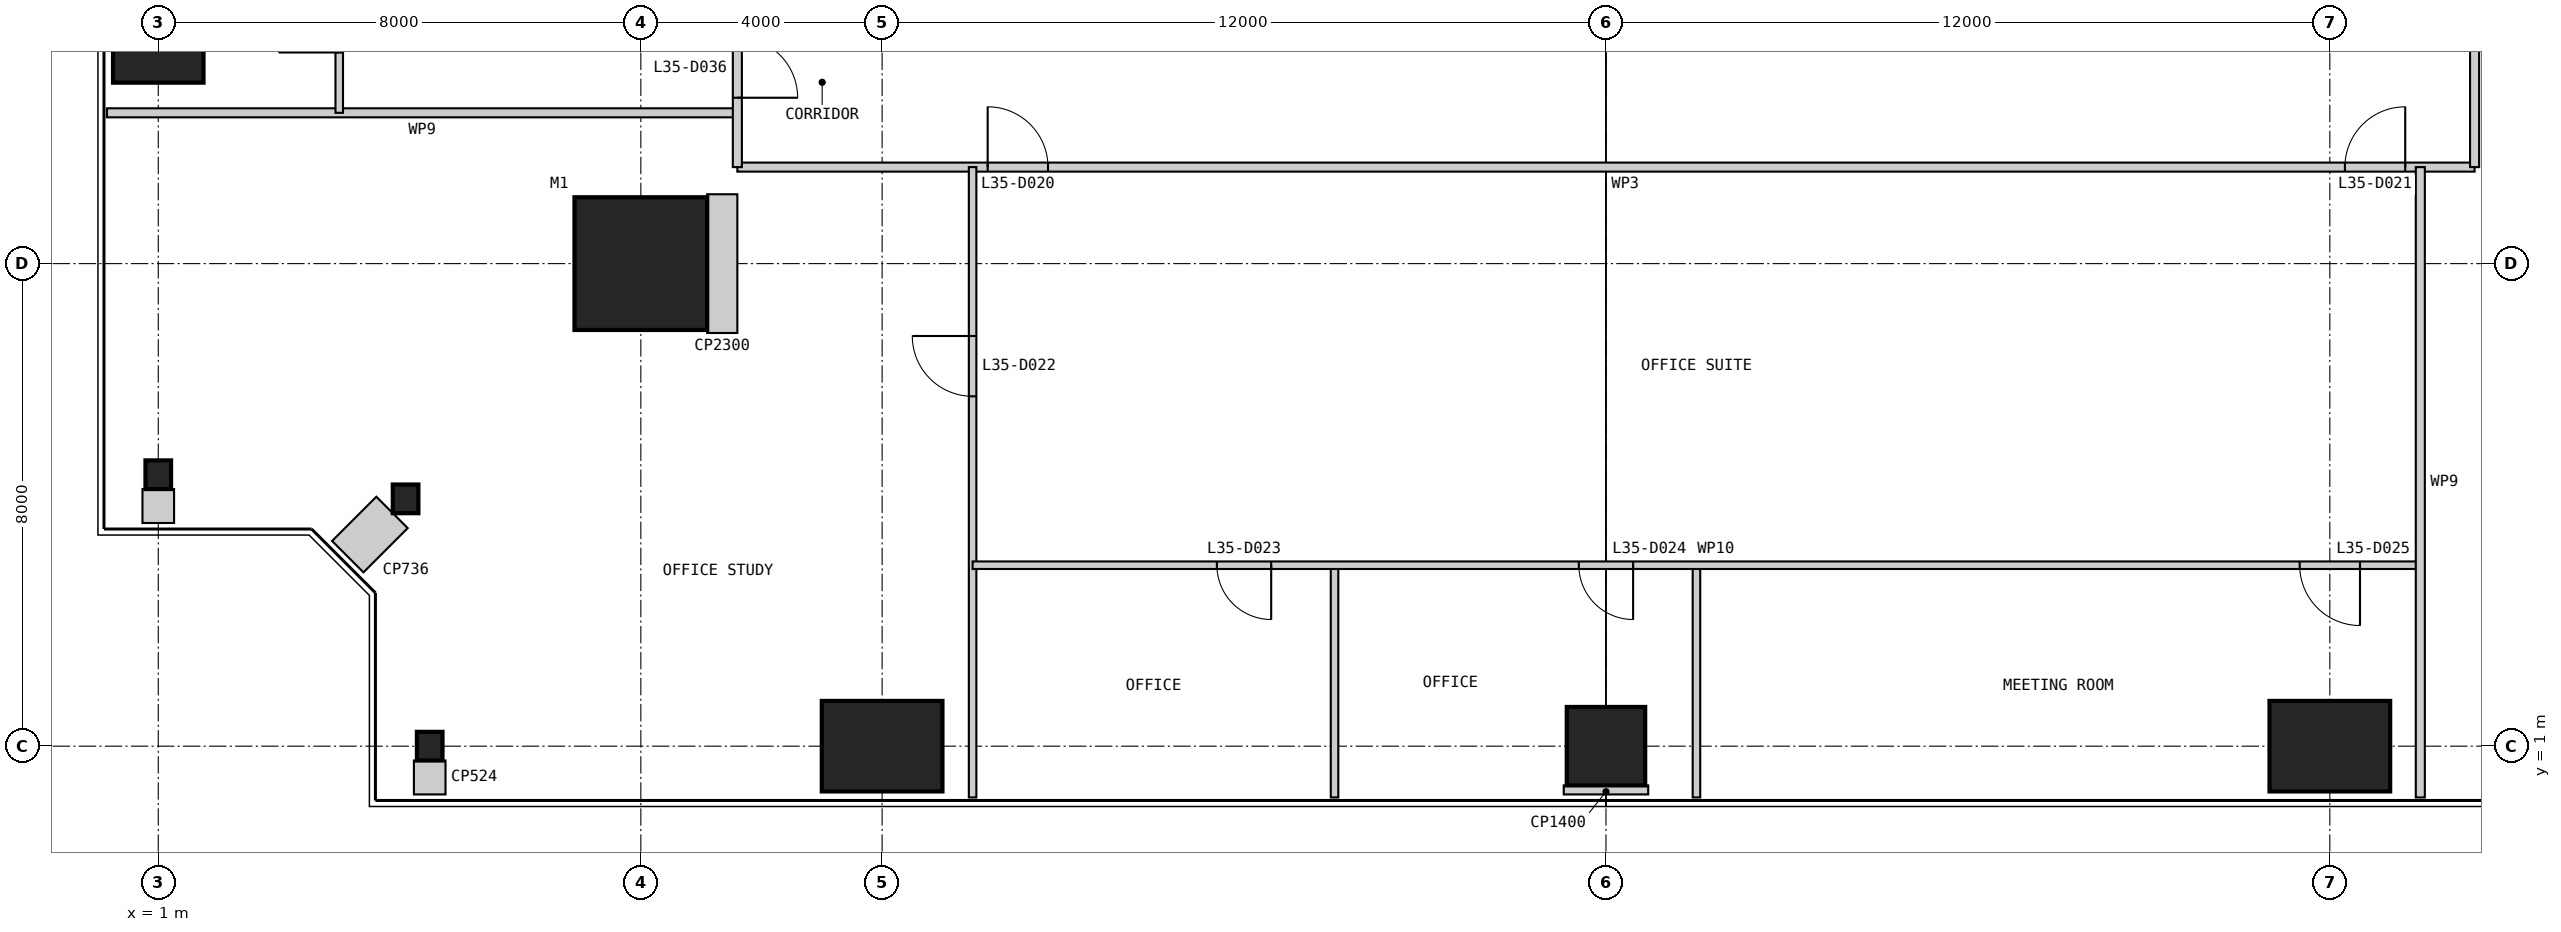
"""IFC4 building model, lengths in metres.
Left out: names, types, materials, properties, quantities, classifications, styles, units other than length and angle.
Written with IfcOpenShell. Run it as: python <this file> out.ifc"""

import sys

from ifc_helpers import new_model, si_unit, direction, frame, frame_2d, origin, origin_2d, place, context, subcontext, project, spatial, rectangle, i_section, extrude, element, fill, save


model = new_model("IFC4")
c1 = context("Model", 3, precision=1e-05, world=origin(), true_north=direction((0.0, 1.0)))
c2 = subcontext(c1, "Body", "Model", "MODEL_VIEW")
j1 = project(units=[si_unit("LENGTHUNIT", "METRE"), si_unit("PLANEANGLEUNIT", "RADIAN")], contexts=[c1])
p1 = place(None, origin())
s1 = spatial("IfcSite", under=j1, at=p1, CompositionType="ELEMENT")
p2 = place(p1, origin())
s2 = spatial("IfcBuilding", under=s1, at=p2, CompositionType="ELEMENT")
p3 = place(p2, frame((0.0, 0.0, 150.4)))
s3 = spatial("IfcBuildingStorey", under=s2, at=p3, CompositionType="ELEMENT", Elevation=150.4)
p4 = place(p3, frame((9.0, 9.0, 0.0), z_axis=(0.0, 0.0, 1.0), x_axis=(1.0, 0.0, 0.0)))
e1 = element("IfcColumn", 1, at=p4, inside=s3, PredefinedType="COLUMN", context=c2, shape_type="SweptSolid", body=[
    extrude(rectangle(XDim=2.2, YDim=2.2, at=origin_2d()), origin(), (0.0, 0.0, 1.0), 4.0),
])
p5 = place(p3, frame((5.5, 1.0, 0.0), z_axis=(0.0, 0.0, 1.0), x_axis=(1.0, 0.0, 0.0)))
e2 = element("IfcColumn", 2, at=p5, inside=s3, PredefinedType="COLUMN", context=c2, shape_type="SweptSolid", body=[
    extrude(i_section(OverallWidth=0.424, OverallDepth=0.475, WebThickness=0.048, FlangeThickness=0.077, at=origin_2d()), origin(), (0.0, 0.0, 1.0), 4.0),
])
p6 = place(p3, frame((13.0, 1.0, 0.0), z_axis=(0.0, 0.0, 1.0), x_axis=(1.0, 0.0, 0.0)))
e3 = element("IfcColumn", 3, at=p6, inside=s3, PredefinedType="COLUMN", context=c2, shape_type="SweptSolid", body=[
    extrude(rectangle(XDim=2.0, YDim=1.5, at=origin_2d()), origin(), (0.0, 0.0, 1.0), 4.0),
])
p7 = place(p3, frame((25.0, 1.0, 0.0), z_axis=(0.0, 0.0, 1.0), x_axis=(1.0, 0.0, 0.0)))
e4 = element("IfcColumn", 4, at=p7, inside=s3, PredefinedType="COLUMN", context=c2, shape_type="SweptSolid", body=[
    extrude(rectangle(XDim=1.3, YDim=1.3, at=origin_2d()), origin(), (0.0, 0.0, 1.0), 4.0),
])
p8 = place(p3, frame((37.0, 1.0, 0.0), z_axis=(0.0, 0.0, 1.0), x_axis=(1.0, 0.0, 0.0)))
e5 = element("IfcColumn", 5, at=p8, inside=s3, PredefinedType="COLUMN", context=c2, shape_type="SweptSolid", body=[
    extrude(rectangle(XDim=2.0, YDim=1.5, at=origin_2d()), origin(), (0.0, 0.0, 1.0), 4.0),
])
p9 = place(p3, frame((1.0, 13.0, 0.0), z_axis=(0.0, 0.0, 1.0), x_axis=(1.0, 0.0, 0.0)))
e6 = element("IfcColumn", 6, at=p9, inside=s3, PredefinedType="COLUMN", context=c2, shape_type="SweptSolid", body=[
    extrude(rectangle(XDim=1.5, YDim=2.0, at=origin_2d()), origin(), (0.0, 0.0, 1.0), 4.0),
])
for number, where, z_axis, x_axis in (
    (7, (1.0, 5.5, 0.0), (0.0, 0.0, 1.0), (1.0, 0.0, 0.0)),
    (8, (5.1, 5.1, 0.0), (0.0, 0.0, 1.0), (1.0, 0.0, 0.0)),
):
    element("IfcColumn", number, at=place(p3, frame(where, z_axis=z_axis, x_axis=x_axis)), inside=s3, PredefinedType="COLUMN", context=c2, shape_type="SweptSolid", body=[
        extrude(i_section(OverallWidth=0.424, OverallDepth=0.475, WebThickness=0.048, FlangeThickness=0.077, at=origin_2d()), origin(), (0.0, 0.0, 1.0), 4.0),
    ])
p10 = place(p3, frame((10.6, 10.6, 0.0), z_axis=(0.0, 0.0, 1.0), x_axis=(1.0, 0.0, 0.0)))
e9 = element("IfcWall", 9, at=p10, inside=s3, PredefinedType="PARTITIONING", context=c2, shape_type="SweptSolid", body=[
    extrude(rectangle(XDim=28.8, YDim=0.15, at=frame_2d((14.4, 0.0))), origin(), (0.0, 0.0, 1.0), 3.85),
])
p11 = place(p10, frame((4.15, 0.0, 0.0)))
e10 = element("IfcOpeningElement", 10, at=p11, cuts=e9, PredefinedType="OPENING", context=c2, shape_type="SweptSolid", body=[
    extrude(rectangle(XDim=1.0, YDim=2.2, at=frame_2d((0.5, 1.1))), frame((0.0, 0.085, 0.0), z_axis=(0.0, -1.0, 0.0), x_axis=(1.0, 0.0, 0.0)), (0.0, 0.0, 1.0), 0.17),
])
p12 = place(p10, frame((26.65, 0.0, 0.0)))
e11 = element("IfcOpeningElement", 11, at=p12, cuts=e9, PredefinedType="OPENING", context=c2, shape_type="SweptSolid", body=[
    extrude(rectangle(XDim=1.0, YDim=2.2, at=frame_2d((0.5, 1.1))), frame((0.0, 0.085, 0.0), z_axis=(0.0, -1.0, 0.0), x_axis=(1.0, 0.0, 0.0)), (0.0, 0.0, 1.0), 0.17),
])
p13 = place(p3, frame((0.15, 11.5, 0.0), z_axis=(0.0, 0.0, 1.0), x_axis=(1.0, 0.0, 0.0)))
e12 = element("IfcWall", 12, at=p13, inside=s3, PredefinedType="PARTITIONING", context=c2, shape_type="SweptSolid", body=[
    extrude(rectangle(XDim=10.45, YDim=0.15, at=frame_2d((5.225, 0.0))), origin(), (0.0, 0.0, 1.0), 3.85),
])
p14 = place(p3, frame((14.5, 0.15, 0.0), z_axis=(0.0, 0.0, 1.0), x_axis=(0.0, 1.0, 0.0)))
e13 = element("IfcWall", 13, at=p14, inside=s3, PredefinedType="PARTITIONING", context=c2, shape_type="SweptSolid", body=[
    extrude(rectangle(XDim=10.45, YDim=0.125, at=frame_2d((5.225, 0.0))), origin(), (0.0, 0.0, 1.0), 3.85),
])
p15 = place(p14, frame((6.65, 0.0, 0.0)))
e14 = element("IfcOpeningElement", 14, at=p15, cuts=e13, PredefinedType="OPENING", context=c2, shape_type="SweptSolid", body=[
    extrude(rectangle(XDim=1.0, YDim=2.2, at=frame_2d((0.5, 1.1))), frame((0.0, 0.073, 0.0), z_axis=(0.0, -1.0, 0.0), x_axis=(1.0, 0.0, 0.0)), (0.0, 0.0, 1.0), 0.145),
])
for number, where, z_axis, x_axis in (
    (15, (20.5, 0.15, 0.0), (0.0, 0.0, 1.0), (0.0, 1.0, 0.0)),
    (16, (26.5, 0.15, 0.0), (0.0, 0.0, 1.0), (0.0, 1.0, 0.0)),
):
    element("IfcWall", number, at=place(p3, frame(where, z_axis=z_axis, x_axis=x_axis)), inside=s3, PredefinedType="PARTITIONING", context=c2, shape_type="SweptSolid", body=[
        extrude(rectangle(XDim=3.85, YDim=0.125, at=frame_2d((1.925, 0.0))), origin(), (0.0, 0.0, 1.0), 3.85),
    ])
p16 = place(p3, frame((14.5, 4.0, 0.0), z_axis=(0.0, 0.0, 1.0), x_axis=(1.0, 0.0, 0.0)))
e17 = element("IfcWall", 17, at=p16, inside=s3, PredefinedType="PARTITIONING", context=c2, shape_type="SweptSolid", body=[
    extrude(rectangle(XDim=24.0, YDim=0.125, at=frame_2d((12.0, 0.0))), origin(), (0.0, 0.0, 1.0), 3.85),
])
p17 = place(p16, frame((4.05, 0.0, 0.0)))
e18 = element("IfcOpeningElement", 18, at=p17, cuts=e17, PredefinedType="OPENING", context=c2, shape_type="SweptSolid", body=[
    extrude(rectangle(XDim=0.9, YDim=2.2, at=frame_2d((0.45, 1.1))), frame((0.0, 0.073, 0.0), z_axis=(0.0, -1.0, 0.0), x_axis=(1.0, 0.0, 0.0)), (0.0, 0.0, 1.0), 0.145),
])
p18 = place(p16, frame((10.05, 0.0, 0.0)))
e19 = element("IfcOpeningElement", 19, at=p18, cuts=e17, PredefinedType="OPENING", context=c2, shape_type="SweptSolid", body=[
    extrude(rectangle(XDim=0.9, YDim=2.2, at=frame_2d((0.45, 1.1))), frame((0.0, 0.073, 0.0), z_axis=(0.0, -1.0, 0.0), x_axis=(1.0, 0.0, 0.0)), (0.0, 0.0, 1.0), 0.145),
])
p19 = place(p16, frame((22.0, 0.0, 0.0)))
e20 = element("IfcOpeningElement", 20, at=p19, cuts=e17, PredefinedType="OPENING", context=c2, shape_type="SweptSolid", body=[
    extrude(rectangle(XDim=1.0, YDim=2.2, at=frame_2d((0.5, 1.1))), frame((0.0, 0.073, 0.0), z_axis=(0.0, -1.0, 0.0), x_axis=(1.0, 0.0, 0.0)), (0.0, 0.0, 1.0), 0.145),
])
p20 = place(p3, frame((39.4, 10.6, 0.0), z_axis=(0.0, 0.0, 1.0), x_axis=(0.0, 1.0, 0.0)))
e21 = element("IfcWall", 21, at=p20, inside=s3, PredefinedType="PARTITIONING", context=c2, shape_type="SweptSolid", body=[
    extrude(rectangle(XDim=27.9, YDim=0.15, at=frame_2d((13.95, 0.0))), origin(), (0.0, 0.0, 1.0), 3.85),
])
p21 = place(p20, frame((4.15, 0.0, 0.0)))
e22 = element("IfcOpeningElement", 22, at=p21, cuts=e21, PredefinedType="OPENING", context=c2, shape_type="SweptSolid", body=[
    extrude(rectangle(XDim=1.0, YDim=2.2, at=frame_2d((0.5, 1.1))), frame((0.0, 0.085, 0.0), z_axis=(0.0, -1.0, 0.0), x_axis=(1.0, 0.0, 0.0)), (0.0, 0.0, 1.0), 0.17),
])
p22 = place(p20, frame((23.65, 0.0, 0.0)))
e23 = element("IfcOpeningElement", 23, at=p22, cuts=e21, PredefinedType="OPENING", context=c2, shape_type="SweptSolid", body=[
    extrude(rectangle(XDim=1.0, YDim=2.2, at=frame_2d((0.5, 1.1))), frame((0.0, 0.085, 0.0), z_axis=(0.0, -1.0, 0.0), x_axis=(1.0, 0.0, 0.0)), (0.0, 0.0, 1.0), 0.17),
])
p23 = place(p3, frame((38.5, 0.15, 0.0), z_axis=(0.0, 0.0, 1.0), x_axis=(0.0, 1.0, 0.0)))
e24 = element("IfcWall", 24, at=p23, inside=s3, PredefinedType="PARTITIONING", context=c2, shape_type="SweptSolid", body=[
    extrude(rectangle(XDim=10.45, YDim=0.15, at=frame_2d((5.225, 0.0))), origin(), (0.0, 0.0, 1.0), 3.85),
])
p24 = place(p3, frame((10.6, 38.5, 0.0), z_axis=(0.0, 0.0, 1.0), x_axis=(0.0, -1.0, 0.0)))
e25 = element("IfcWall", 25, at=p24, inside=s3, PredefinedType="PARTITIONING", context=c2, shape_type="SweptSolid", body=[
    extrude(rectangle(XDim=27.9, YDim=0.15, at=frame_2d((13.95, 0.0))), origin(), (0.0, 0.0, 1.0), 3.85),
])
p25 = place(p24, frame((3.25, 0.0, 0.0)))
e26 = element("IfcOpeningElement", 26, at=p25, cuts=e25, PredefinedType="OPENING", context=c2, shape_type="SweptSolid", body=[
    extrude(rectangle(XDim=1.0, YDim=2.2, at=frame_2d((0.5, 1.1))), frame((0.0, 0.085, 0.0), z_axis=(0.0, -1.0, 0.0), x_axis=(1.0, 0.0, 0.0)), (0.0, 0.0, 1.0), 0.17),
])
p26 = place(p24, frame((25.75, 0.0, 0.0)))
e27 = element("IfcOpeningElement", 27, at=p26, cuts=e25, PredefinedType="OPENING", context=c2, shape_type="SweptSolid", body=[
    extrude(rectangle(XDim=1.0, YDim=2.2, at=frame_2d((0.5, 1.1))), frame((0.0, 0.085, 0.0), z_axis=(0.0, -1.0, 0.0), x_axis=(1.0, 0.0, 0.0)), (0.0, 0.0, 1.0), 0.17),
])
p27 = place(p3, frame((4.0, 35.5, 0.0), z_axis=(0.0, 0.0, 1.0), x_axis=(0.0, -1.0, 0.0)))
e28 = element("IfcWall", 28, at=p27, inside=s3, PredefinedType="PARTITIONING", context=c2, shape_type="SweptSolid", body=[
    extrude(rectangle(XDim=24.0, YDim=0.125, at=frame_2d((12.0, 0.0))), origin(), (0.0, 0.0, 1.0), 3.238),
])
p28 = place(p27, frame((4.05, 0.0, 0.0)))
e29 = element("IfcOpeningElement", 29, at=p28, cuts=e28, PredefinedType="OPENING", context=c2, shape_type="SweptSolid", body=[
    extrude(rectangle(XDim=0.9, YDim=2.2, at=frame_2d((0.45, 1.1))), frame((0.0, 0.073, 0.0), z_axis=(0.0, -1.0, 0.0), x_axis=(1.0, 0.0, 0.0)), (0.0, 0.0, 1.0), 0.145),
])
p29 = place(p27, frame((10.05, 0.0, 0.0)))
e30 = element("IfcOpeningElement", 30, at=p29, cuts=e28, PredefinedType="OPENING", context=c2, shape_type="SweptSolid", body=[
    extrude(rectangle(XDim=0.9, YDim=2.2, at=frame_2d((0.45, 1.1))), frame((0.0, 0.073, 0.0), z_axis=(0.0, -1.0, 0.0), x_axis=(1.0, 0.0, 0.0)), (0.0, 0.0, 1.0), 0.145),
])
p30 = place(p27, frame((22.0, 0.0, 0.0)))
e31 = element("IfcOpeningElement", 31, at=p30, cuts=e28, PredefinedType="OPENING", context=c2, shape_type="SweptSolid", body=[
    extrude(rectangle(XDim=1.0, YDim=2.2, at=frame_2d((0.5, 1.1))), frame((0.0, 0.073, 0.0), z_axis=(0.0, -1.0, 0.0), x_axis=(1.0, 0.0, 0.0)), (0.0, 0.0, 1.0), 0.145),
])
p31 = place(p3, frame((10.6, 9.0, 0.0), z_axis=(0.0, 0.0, 1.0), x_axis=(-1.0, 0.0, 0.0)))
e32 = element("IfcWall", 32, at=p31, inside=s3, PredefinedType="PARTITIONING", context=c2, shape_type="SweptSolid", body=[
    extrude(rectangle(XDim=0.5, YDim=2.3, at=frame_2d((0.25, 0.0))), origin(), (0.0, 0.0, 1.0), 3.85),
])
for number, where, z_axis, x_axis in (
    (33, (5.5, 0.2, 0.0), (0.0, 0.0, 1.0), (0.0, 1.0, 0.0)),
    (34, (1.0, 4.7, 0.0), (0.0, 0.0, 1.0), (0.0, 1.0, 0.0)),
):
    element("IfcWall", number, at=place(p3, frame(where, z_axis=z_axis, x_axis=x_axis)), inside=s3, PredefinedType="PARTITIONING", context=c2, shape_type="SweptSolid", body=[
        extrude(rectangle(XDim=0.562, YDim=0.524, at=frame_2d((0.281, 0.0))), origin(), (0.0, 0.0, 1.0), 3.85),
    ])
p32 = place(p3, frame((4.141, 4.141, 0.0), z_axis=(0.0, 0.0, 1.0), x_axis=(0.707106781187, 0.707106781187, 0.0)))
e35 = element("IfcWall", 35, at=p32, inside=s3, PredefinedType="PARTITIONING", context=c2, shape_type="SweptSolid", body=[
    extrude(rectangle(XDim=1.038, YDim=0.736, at=frame_2d((0.519, 0.0))), origin(), (0.0, 0.0, 1.0), 3.85),
])
p33 = place(p3, frame((25.0, 0.2, 0.0), z_axis=(0.0, 0.0, 1.0), x_axis=(0.0, 1.0, 0.0)))
e36 = element("IfcWall", 36, at=p33, inside=s3, PredefinedType="PARTITIONING", context=c2, shape_type="SweptSolid", body=[
    extrude(rectangle(XDim=0.15, YDim=1.4, at=frame_2d((0.075, 0.0))), origin(), (0.0, 0.0, 1.0), 3.85),
])
p34 = place(p11, origin())
e37 = element("IfcDoor", 37, at=p34, inside=s3, OperationType="SINGLE_SWING_LEFT", PredefinedType="DOOR", context=c2, shape_type="SweptSolid", body=[
    extrude(rectangle(XDim=1.0, YDim=2.2, at=frame_2d((0.5, 1.1))), frame((0.0, 0.025, 0.0), z_axis=(0.0, -1.0, 0.0), x_axis=(1.0, 0.0, 0.0)), (0.0, 0.0, 1.0), 0.05),
])
fill(e10, e37)
p35 = place(p12, origin())
e38 = element("IfcDoor", 38, at=p35, inside=s3, OperationType="SINGLE_SWING_RIGHT", PredefinedType="DOOR", context=c2, shape_type="SweptSolid", body=[
    extrude(rectangle(XDim=1.0, YDim=2.2, at=frame_2d((0.5, 1.1))), frame((0.0, 0.025, 0.0), z_axis=(0.0, -1.0, 0.0), x_axis=(1.0, 0.0, 0.0)), (0.0, 0.0, 1.0), 0.05),
])
fill(e11, e38)
p36 = place(p15, origin())
e39 = element("IfcDoor", 39, at=p36, inside=s3, OperationType="SINGLE_SWING_RIGHT", PredefinedType="DOOR", context=c2, shape_type="SweptSolid", body=[
    extrude(rectangle(XDim=1.0, YDim=2.2, at=frame_2d((0.5, 1.1))), frame((0.0, 0.025, 0.0), z_axis=(0.0, -1.0, 0.0), x_axis=(1.0, 0.0, 0.0)), (0.0, 0.0, 1.0), 0.05),
])
fill(e14, e39)
p37 = place(p17, frame((0.9, 0.0, 0.0), z_axis=(0.0, 0.0, 1.0), x_axis=(-1.0, 0.0, 0.0)))
e40 = element("IfcDoor", 40, at=p37, inside=s3, OperationType="SINGLE_SWING_LEFT", PredefinedType="DOOR", context=c2, shape_type="SweptSolid", body=[
    extrude(rectangle(XDim=0.9, YDim=2.2, at=frame_2d((0.45, 1.1))), frame((0.0, 0.025, 0.0), z_axis=(0.0, -1.0, 0.0), x_axis=(1.0, 0.0, 0.0)), (0.0, 0.0, 1.0), 0.05),
])
fill(e18, e40)
p38 = place(p18, frame((0.9, 0.0, 0.0), z_axis=(0.0, 0.0, 1.0), x_axis=(-1.0, 0.0, 0.0)))
e41 = element("IfcDoor", 41, at=p38, inside=s3, OperationType="SINGLE_SWING_LEFT", PredefinedType="DOOR", context=c2, shape_type="SweptSolid", body=[
    extrude(rectangle(XDim=0.9, YDim=2.2, at=frame_2d((0.45, 1.1))), frame((0.0, 0.025, 0.0), z_axis=(0.0, -1.0, 0.0), x_axis=(1.0, 0.0, 0.0)), (0.0, 0.0, 1.0), 0.05),
])
fill(e19, e41)
p39 = place(p19, frame((1.0, 0.0, 0.0), z_axis=(0.0, 0.0, 1.0), x_axis=(-1.0, 0.0, 0.0)))
e42 = element("IfcDoor", 42, at=p39, inside=s3, OperationType="SINGLE_SWING_LEFT", PredefinedType="DOOR", context=c2, shape_type="SweptSolid", body=[
    extrude(rectangle(XDim=1.0, YDim=2.2, at=frame_2d((0.5, 1.1))), frame((0.0, 0.025, 0.0), z_axis=(0.0, -1.0, 0.0), x_axis=(1.0, 0.0, 0.0)), (0.0, 0.0, 1.0), 0.05),
])
fill(e20, e42)
p40 = place(p26, origin())
e43 = element("IfcDoor", 43, at=p40, inside=s3, OperationType="SINGLE_SWING_RIGHT", PredefinedType="DOOR", context=c2, shape_type="SweptSolid", body=[
    extrude(rectangle(XDim=1.0, YDim=2.2, at=frame_2d((0.5, 1.1))), frame((0.0, 0.025, 0.0), z_axis=(0.0, -1.0, 0.0), x_axis=(1.0, 0.0, 0.0)), (0.0, 0.0, 1.0), 0.05),
])
fill(e27, e43)
save(model, sys.argv[1])
